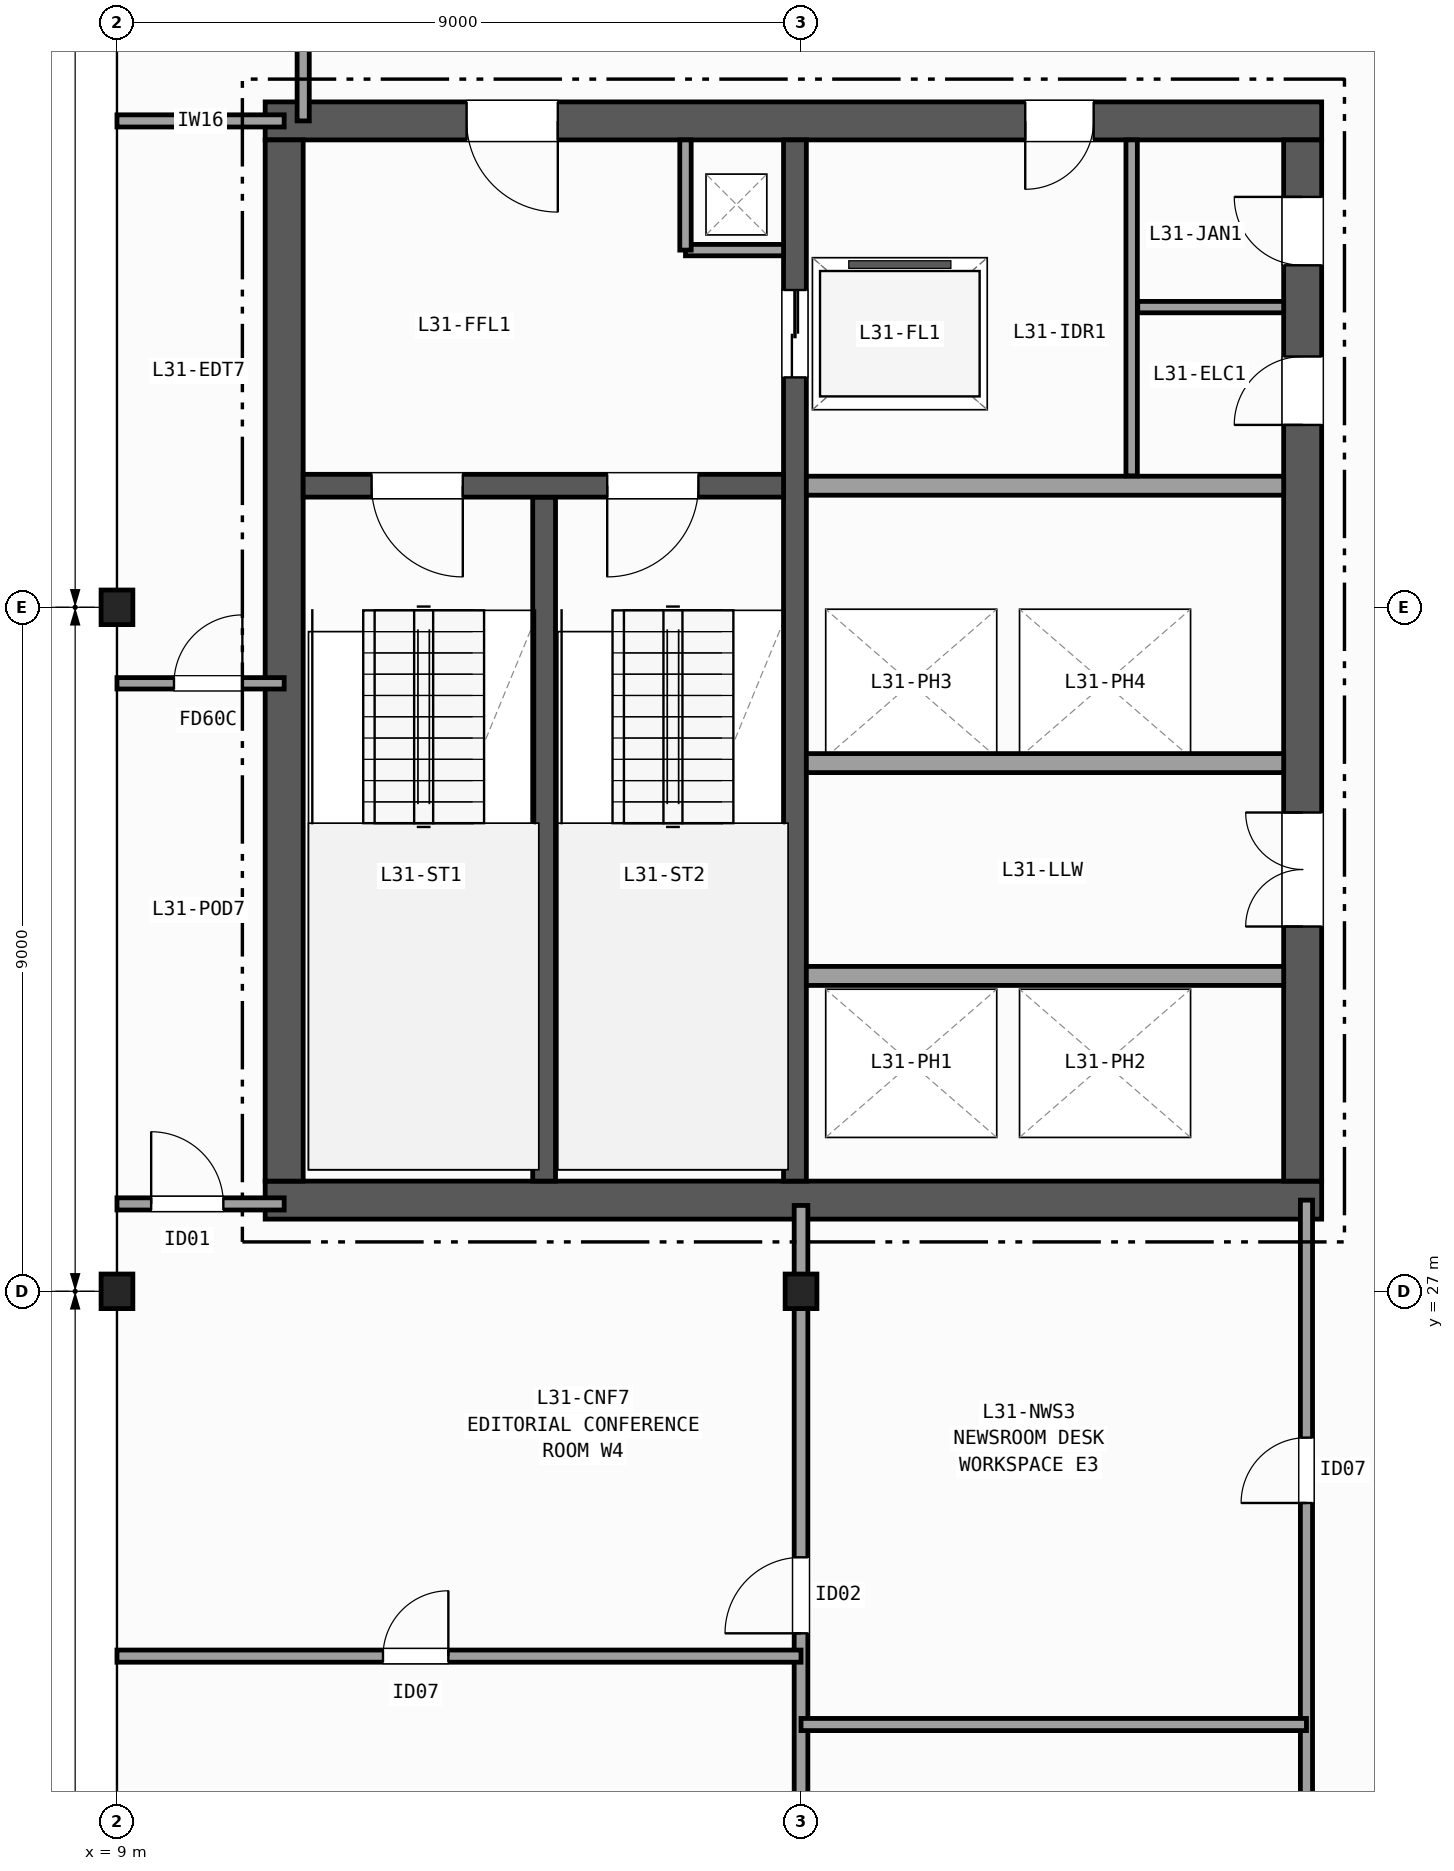
"""IFC4 building model, lengths in metres.
Left out: names, types, materials, properties, quantities, classifications, styles, units other than length and angle.
Written with IfcOpenShell. Run it as: python <this file> out.ifc"""

import sys

from ifc_helpers import new_model, si_unit, direction, frame, frame_2d, origin, origin_2d, place, context, subcontext, project, spatial, rectangle, i_section, extrude, element, fill, save


model = new_model("IFC4")
c1 = context("Model", 3, precision=1e-05, world=origin(), true_north=direction((0.0, 1.0)))
c2 = subcontext(c1, "Body", "Model", "MODEL_VIEW")
j1 = project(units=[si_unit("LENGTHUNIT", "METRE"), si_unit("PLANEANGLEUNIT", "RADIAN")], contexts=[c1])
p1 = place(None, origin())
s1 = spatial("IfcSite", under=j1, at=p1, CompositionType="ELEMENT")
p2 = place(p1, origin())
s2 = spatial("IfcBuilding", under=s1, at=p2, CompositionType="ELEMENT")
p3 = place(p2, frame((0.0, 0.0, 128.5)))
s3 = spatial("IfcBuildingStorey", under=s2, at=p3, CompositionType="ELEMENT", Elevation=128.5)
for number, where, z_axis, x_axis in (
    (1, (9.0, 27.0, 0.0), (0.0, 0.0, 1.0), (1.0, 0.0, 0.0)),
    (2, (9.0, 36.0, 0.0), (0.0, 0.0, 1.0), (1.0, 0.0, 0.0)),
    (3, (18.0, 27.0, 0.0), (0.0, 0.0, 1.0), (1.0, 0.0, 0.0)),
):
    element("IfcColumn", number, at=place(p3, frame(where, z_axis=z_axis, x_axis=x_axis)), inside=s3, PredefinedType="COLUMN", context=c2, shape_type="SweptSolid", body=[
        extrude(i_section(OverallWidth=0.418, OverallDepth=0.455, WebThickness=0.042, FlangeThickness=0.068, FilletRadius=0.015, at=origin_2d()), origin(), (0.0, 0.0, 1.0), 3.7),
    ])
p4 = place(p3, frame((10.95, 28.2, 0.0), z_axis=(0.0, 0.0, 1.0), x_axis=(1.0, 0.0, 0.0)))
e4 = element("IfcWall", 4, at=p4, inside=s3, PredefinedType="SHEAR", context=c2, shape_type="SweptSolid", body=[
    extrude(rectangle(XDim=13.9, YDim=0.5, at=frame_2d((6.95, 0.0))), origin(), (0.0, 0.0, 1.0), 3.42),
])
p5 = place(p3, frame((24.85, 42.4, 0.0), z_axis=(0.0, 0.0, 1.0), x_axis=(-1.0, 0.0, 0.0)))
e5 = element("IfcWall", 5, at=p5, inside=s3, PredefinedType="SHEAR", context=c2, shape_type="SweptSolid", body=[
    extrude(rectangle(XDim=13.9, YDim=0.5, at=frame_2d((6.95, 0.0))), origin(), (0.0, 0.0, 1.0), 3.42),
])
p6 = place(p5, frame((10.05, 0.0, 0.0)))
e6 = element("IfcOpeningElement", 6, at=p6, cuts=e5, PredefinedType="OPENING", context=c2, shape_type="SweptSolid", body=[
    extrude(rectangle(XDim=1.2, YDim=2.15, at=frame_2d((0.6, 1.075))), frame((0.0, 0.26, 0.0), z_axis=(0.0, -1.0, 0.0), x_axis=(1.0, 0.0, 0.0)), (0.0, 0.0, 1.0), 0.52),
])
p7 = place(p5, frame((3.0, 0.0, 0.0)))
e7 = element("IfcOpeningElement", 7, at=p7, cuts=e5, PredefinedType="OPENING", context=c2, shape_type="SweptSolid", body=[
    extrude(rectangle(XDim=0.9, YDim=2.1, at=frame_2d((0.45, 1.05))), frame((0.0, 0.26, 0.0), z_axis=(0.0, -1.0, 0.0), x_axis=(1.0, 0.0, 0.0)), (0.0, 0.0, 1.0), 0.52),
])
p8 = place(p3, frame((11.2, 42.15, 0.0), z_axis=(0.0, 0.0, 1.0), x_axis=(0.0, -1.0, 0.0)))
e8 = element("IfcWall", 8, at=p8, inside=s3, PredefinedType="SHEAR", context=c2, shape_type="SweptSolid", body=[
    extrude(rectangle(XDim=13.7, YDim=0.5, at=frame_2d((6.85, 0.0))), origin(), (0.0, 0.0, 1.0), 3.42),
])
p9 = place(p3, frame((24.6, 28.45, 0.0), z_axis=(0.0, 0.0, 1.0), x_axis=(0.0, 1.0, 0.0)))
e9 = element("IfcWall", 9, at=p9, inside=s3, PredefinedType="SHEAR", context=c2, shape_type="SweptSolid", body=[
    extrude(rectangle(XDim=13.7, YDim=0.5, at=frame_2d((6.85, 0.0))), origin(), (0.0, 0.0, 1.0), 3.42),
])
p10 = place(p9, frame((3.35, 0.0, 0.0)))
e10 = element("IfcOpeningElement", 10, at=p10, cuts=e9, PredefinedType="OPENING", context=c2, shape_type="SweptSolid", body=[
    extrude(rectangle(XDim=1.5, YDim=2.2, at=frame_2d((0.75, 1.1))), frame((0.0, 0.26, 0.0), z_axis=(0.0, -1.0, 0.0), x_axis=(1.0, 0.0, 0.0)), (0.0, 0.0, 1.0), 0.52),
])
p11 = place(p9, frame((9.95, 0.0, 0.0)))
e11 = element("IfcOpeningElement", 11, at=p11, cuts=e9, PredefinedType="OPENING", context=c2, shape_type="SweptSolid", body=[
    extrude(rectangle(XDim=0.9, YDim=2.1, at=frame_2d((0.45, 1.05))), frame((0.0, 0.26, 0.0), z_axis=(0.0, -1.0, 0.0), x_axis=(1.0, 0.0, 0.0)), (0.0, 0.0, 1.0), 0.52),
])
p12 = place(p9, frame((12.05, 0.0, 0.0)))
e12 = element("IfcOpeningElement", 12, at=p12, cuts=e9, PredefinedType="OPENING", context=c2, shape_type="SweptSolid", body=[
    extrude(rectangle(XDim=0.9, YDim=2.1, at=frame_2d((0.45, 1.05))), frame((0.0, 0.26, 0.0), z_axis=(0.0, -1.0, 0.0), x_axis=(1.0, 0.0, 0.0)), (0.0, 0.0, 1.0), 0.52),
])
p13 = place(p3, frame((14.62, 28.45, 0.0), z_axis=(0.0, 0.0, 1.0), x_axis=(0.0, 1.0, 0.0)))
e13 = element("IfcWall", 13, at=p13, inside=s3, PredefinedType="SHEAR", context=c2, shape_type="SweptSolid", body=[
    extrude(rectangle(XDim=9.0, YDim=0.3, at=frame_2d((4.5, 0.0))), origin(), (0.0, 0.0, 1.0), 3.42),
])
p14 = place(p3, frame((17.92, 42.15, 0.0), z_axis=(0.0, 0.0, 1.0), x_axis=(0.0, -1.0, 0.0)))
e14 = element("IfcWall", 14, at=p14, inside=s3, PredefinedType="SHEAR", context=c2, shape_type="SweptSolid", body=[
    extrude(rectangle(XDim=13.7, YDim=0.3, at=frame_2d((6.85, 0.0))), origin(), (0.0, 0.0, 1.0), 3.42),
])
p15 = place(p14, frame((1.975, 0.0, 0.0)))
e15 = element("IfcOpeningElement", 15, at=p15, cuts=e14, PredefinedType="OPENING", context=c2, shape_type="SweptSolid", body=[
    extrude(rectangle(XDim=1.15, YDim=2.15, at=frame_2d((0.575, 1.075))), frame((0.0, 0.16, 0.0), z_axis=(0.0, -1.0, 0.0), x_axis=(1.0, 0.0, 0.0)), (0.0, 0.0, 1.0), 0.32),
])
p16 = place(p3, frame((17.77, 37.6, 0.0), z_axis=(0.0, 0.0, 1.0), x_axis=(-1.0, 0.0, 0.0)))
e16 = element("IfcWall", 16, at=p16, inside=s3, PredefinedType="SHEAR", context=c2, shape_type="SweptSolid", body=[
    extrude(rectangle(XDim=6.32, YDim=0.3, at=frame_2d((3.16, 0.0))), origin(), (0.0, 0.0, 1.0), 3.42),
])
p17 = place(p16, frame((4.22, 0.0, 0.0)))
e17 = element("IfcOpeningElement", 17, at=p17, cuts=e16, PredefinedType="OPENING", context=c2, shape_type="SweptSolid", body=[
    extrude(rectangle(XDim=1.2, YDim=2.15, at=frame_2d((0.6, 1.075))), frame((0.0, 0.16, 0.0), z_axis=(0.0, -1.0, 0.0), x_axis=(1.0, 0.0, 0.0)), (0.0, 0.0, 1.0), 0.32),
])
p18 = place(p16, frame((1.12, 0.0, 0.0)))
e18 = element("IfcOpeningElement", 18, at=p18, cuts=e16, PredefinedType="OPENING", context=c2, shape_type="SweptSolid", body=[
    extrude(rectangle(XDim=1.2, YDim=2.15, at=frame_2d((0.6, 1.075))), frame((0.0, 0.16, 0.0), z_axis=(0.0, -1.0, 0.0), x_axis=(1.0, 0.0, 0.0)), (0.0, 0.0, 1.0), 0.32),
])
p19 = place(p3, frame((16.48, 40.7, 0.0), z_axis=(0.0, 0.0, 1.0), x_axis=(1.0, 0.0, 0.0)))
e19 = element("IfcWall", 19, at=p19, inside=s3, PredefinedType="PARTITIONING", context=c2, shape_type="SweptSolid", body=[
    extrude(rectangle(XDim=1.29, YDim=0.15, at=frame_2d((0.645, 0.0))), origin(), (0.0, 0.0, 1.0), 3.42),
])
p20 = place(p3, frame((16.48, 40.7, 0.0), z_axis=(0.0, 0.0, 1.0), x_axis=(0.0, 1.0, 0.0)))
e20 = element("IfcWall", 20, at=p20, inside=s3, PredefinedType="PARTITIONING", context=c2, shape_type="SweptSolid", body=[
    extrude(rectangle(XDim=1.45, YDim=0.15, at=frame_2d((0.725, 0.0))), origin(), (0.0, 0.0, 1.0), 3.42),
])
for number, where, z_axis, x_axis in (
    (21, (18.07, 37.6, 0.0), (0.0, 0.0, 1.0), (1.0, 0.0, 0.0)),
    (22, (18.07, 31.15, 0.0), (0.0, 0.0, 1.0), (1.0, 0.0, 0.0)),
    (23, (24.35, 33.95, 0.0), (0.0, 0.0, 1.0), (-1.0, 0.0, 0.0)),
):
    element("IfcWall", number, at=place(p3, frame(where, z_axis=z_axis, x_axis=x_axis)), inside=s3, PredefinedType="PARTITIONING", context=c2, shape_type="SweptSolid", body=[
        extrude(rectangle(XDim=6.28, YDim=0.25, at=frame_2d((3.14, 0.0))), origin(), (0.0, 0.0, 1.0), 3.42),
    ])
p21 = place(p3, frame((22.35, 37.73, 0.0), z_axis=(0.0, 0.0, 1.0), x_axis=(0.0, 1.0, 0.0)))
e24 = element("IfcWall", 24, at=p21, inside=s3, PredefinedType="PARTITIONING", context=c2, shape_type="SweptSolid", body=[
    extrude(rectangle(XDim=4.42, YDim=0.15, at=frame_2d((2.21, 0.0))), origin(), (0.0, 0.0, 1.0), 3.42),
])
p22 = place(p3, frame((22.43, 39.95, 0.0), z_axis=(0.0, 0.0, 1.0), x_axis=(1.0, 0.0, 0.0)))
e25 = element("IfcWall", 25, at=p22, inside=s3, PredefinedType="PARTITIONING", context=c2, shape_type="SweptSolid", body=[
    extrude(rectangle(XDim=1.92, YDim=0.15, at=frame_2d((0.96, 0.0))), origin(), (0.0, 0.0, 1.0), 3.42),
])
p23 = place(p3, frame((9.0, 28.15, 0.0), z_axis=(0.0, 0.0, 1.0), x_axis=(1.0, 0.0, 0.0)))
e26 = element("IfcWall", 26, at=p23, inside=s3, PredefinedType="PARTITIONING", context=c2, shape_type="SweptSolid", body=[
    extrude(rectangle(XDim=2.2, YDim=0.16, at=frame_2d((1.1, 0.0))), origin(), (0.0, 0.0, 1.0), 2.634),
])
p24 = place(p23, frame((0.45, 0.0, 0.0)))
e27 = element("IfcOpeningElement", 27, at=p24, cuts=e26, PredefinedType="OPENING", context=c2, shape_type="SweptSolid", body=[
    extrude(rectangle(XDim=0.95, YDim=2.1, at=frame_2d((0.475, 1.05))), frame((0.0, 0.09, 0.0), z_axis=(0.0, -1.0, 0.0), x_axis=(1.0, 0.0, 0.0)), (0.0, 0.0, 1.0), 0.18),
])
p25 = place(p3, frame((9.0, 42.4, 0.0), z_axis=(0.0, 0.0, 1.0), x_axis=(1.0, 0.0, 0.0)))
e28 = element("IfcWall", 28, at=p25, inside=s3, PredefinedType="PARTITIONING", context=c2, shape_type="SweptSolid", body=[
    extrude(rectangle(XDim=2.2, YDim=0.16, at=frame_2d((1.1, 0.0))), origin(), (0.0, 0.0, 1.0), 2.634),
])
p26 = place(p3, frame((11.45, 42.4, 0.0), z_axis=(0.0, 0.0, 1.0), x_axis=(0.0, 1.0, 0.0)))
e29 = element("IfcWall", 29, at=p26, inside=s3, PredefinedType="PARTITIONING", context=c2, shape_type="SweptSolid", body=[
    extrude(rectangle(XDim=2.1, YDim=0.16, at=frame_2d((1.05, 0.0))), origin(), (0.0, 0.0, 1.0), 3.42),
])
p27 = place(p3, frame((9.0, 35.0, 0.0), z_axis=(0.0, 0.0, 1.0), x_axis=(1.0, 0.0, 0.0)))
e30 = element("IfcWall", 30, at=p27, inside=s3, PredefinedType="PARTITIONING", context=c2, shape_type="SweptSolid", body=[
    extrude(rectangle(XDim=2.2, YDim=0.15, at=frame_2d((1.1, 0.0))), origin(), (0.0, 0.0, 1.0), 2.634),
])
p28 = place(p27, frame((0.75, 0.0, 0.0)))
e31 = element("IfcOpeningElement", 31, at=p28, cuts=e30, PredefinedType="OPENING", context=c2, shape_type="SweptSolid", body=[
    extrude(rectangle(XDim=0.9, YDim=2.1, at=frame_2d((0.45, 1.05))), frame((0.0, 0.085, 0.0), z_axis=(0.0, -1.0, 0.0), x_axis=(1.0, 0.0, 0.0)), (0.0, 0.0, 1.0), 0.17),
])
p29 = place(p3, frame((24.65, 9.0, 0.0), z_axis=(0.0, 0.0, 1.0), x_axis=(0.0, 1.0, 0.0)))
e32 = element("IfcWall", 32, at=p29, inside=s3, PredefinedType="PARTITIONING", context=c2, shape_type="SweptSolid", body=[
    extrude(rectangle(XDim=19.2, YDim=0.16, at=frame_2d((9.6, 0.0))), origin(), (0.0, 0.0, 1.0), 2.634),
])
p30 = place(p29, frame((2.0, 0.0, 0.0)))
e33 = element("IfcOpeningElement", 33, at=p30, cuts=e32, PredefinedType="OPENING", context=c2, shape_type="SweptSolid", body=[
    extrude(rectangle(XDim=1.05, YDim=2.15, at=frame_2d((0.525, 1.075))), frame((0.0, 0.09, 0.0), z_axis=(0.0, -1.0, 0.0), x_axis=(1.0, 0.0, 0.0)), (0.0, 0.0, 1.0), 0.18),
])
p31 = place(p29, frame((8.15, 0.0, 0.0)))
e34 = element("IfcOpeningElement", 34, at=p31, cuts=e32, PredefinedType="OPENING", context=c2, shape_type="SweptSolid", body=[
    extrude(rectangle(XDim=1.2, YDim=2.15, at=frame_2d((0.6, 1.075))), frame((0.0, 0.09, 0.0), z_axis=(0.0, -1.0, 0.0), x_axis=(1.0, 0.0, 0.0)), (0.0, 0.0, 1.0), 0.18),
])
p32 = place(p29, frame((15.215, 0.0, 0.0)))
e35 = element("IfcOpeningElement", 35, at=p32, cuts=e32, PredefinedType="OPENING", context=c2, shape_type="SweptSolid", body=[
    extrude(rectangle(XDim=0.86, YDim=2.05, at=frame_2d((0.43, 1.025))), frame((0.0, 0.09, 0.0), z_axis=(0.0, -1.0, 0.0), x_axis=(1.0, 0.0, 0.0)), (0.0, 0.0, 1.0), 0.18),
])
p33 = place(p3, frame((18.0, 9.0, 0.0), z_axis=(0.0, 0.0, 1.0), x_axis=(0.0, 1.0, 0.0)))
e36 = element("IfcWall", 36, at=p33, inside=s3, PredefinedType="PARTITIONING", context=c2, shape_type="SweptSolid", body=[
    extrude(rectangle(XDim=19.13, YDim=0.18, at=frame_2d((9.565, 0.0))), origin(), (0.0, 0.0, 1.0), 2.634),
])
p34 = place(p33, frame((2.2, 0.0, 0.0)))
e37 = element("IfcOpeningElement", 37, at=p34, cuts=e36, PredefinedType="OPENING", context=c2, shape_type="SweptSolid", body=[
    extrude(rectangle(XDim=0.95, YDim=2.1, at=frame_2d((0.475, 1.05))), frame((0.0, 0.1, 0.0), z_axis=(0.0, -1.0, 0.0), x_axis=(1.0, 0.0, 0.0)), (0.0, 0.0, 1.0), 0.2),
])
p35 = place(p33, frame((13.5, 0.0, 0.0)))
e38 = element("IfcOpeningElement", 38, at=p35, cuts=e36, PredefinedType="OPENING", context=c2, shape_type="SweptSolid", body=[
    extrude(rectangle(XDim=1.0, YDim=2.1, at=frame_2d((0.5, 1.05))), frame((0.0, 0.1, 0.0), z_axis=(0.0, -1.0, 0.0), x_axis=(1.0, 0.0, 0.0)), (0.0, 0.0, 1.0), 0.2),
])
p36 = place(p3, frame((18.0, 21.3, 0.0), z_axis=(0.0, 0.0, 1.0), x_axis=(1.0, 0.0, 0.0)))
e39 = element("IfcWall", 39, at=p36, inside=s3, PredefinedType="PARTITIONING", context=c2, shape_type="SweptSolid", body=[
    extrude(rectangle(XDim=6.65, YDim=0.16, at=frame_2d((3.325, 0.0))), origin(), (0.0, 0.0, 1.0), 2.792),
])
p37 = place(p3, frame((9.0, 22.2, 0.0), z_axis=(0.0, 0.0, 1.0), x_axis=(1.0, 0.0, 0.0)))
e40 = element("IfcWall", 40, at=p37, inside=s3, PredefinedType="PARTITIONING", context=c2, shape_type="SweptSolid", body=[
    extrude(rectangle(XDim=9.0, YDim=0.16, at=frame_2d((4.5, 0.0))), origin(), (0.0, 0.0, 1.0), 2.634),
])
p38 = place(p37, frame((3.5, 0.0, 0.0)))
e41 = element("IfcOpeningElement", 41, at=p38, cuts=e40, PredefinedType="OPENING", context=c2, shape_type="SweptSolid", body=[
    extrude(rectangle(XDim=0.86, YDim=2.05, at=frame_2d((0.43, 1.025))), frame((0.0, 0.09, 0.0), z_axis=(0.0, -1.0, 0.0), x_axis=(1.0, 0.0, 0.0)), (0.0, 0.0, 1.0), 0.18),
])
p39 = place(p17, origin())
e42 = element("IfcDoor", 42, at=p39, inside=s3, OperationType="SINGLE_SWING_LEFT", PredefinedType="DOOR", context=c2, shape_type="SweptSolid", body=[
    extrude(rectangle(XDim=1.2, YDim=2.15, at=frame_2d((0.6, 1.075))), frame((0.0, 0.025, 0.0), z_axis=(0.0, -1.0, 0.0), x_axis=(1.0, 0.0, 0.0)), (0.0, 0.0, 1.0), 0.05),
])
fill(e17, e42)
p40 = place(p18, origin())
e43 = element("IfcDoor", 43, at=p40, inside=s3, OperationType="SINGLE_SWING_RIGHT", PredefinedType="DOOR", context=c2, shape_type="SweptSolid", body=[
    extrude(rectangle(XDim=1.2, YDim=2.15, at=frame_2d((0.6, 1.075))), frame((0.0, 0.025, 0.0), z_axis=(0.0, -1.0, 0.0), x_axis=(1.0, 0.0, 0.0)), (0.0, 0.0, 1.0), 0.05),
])
fill(e18, e43)
p41 = place(p10, origin())
e44 = element("IfcDoor", 44, at=p41, inside=s3, OperationType="DOUBLE_DOOR_SINGLE_SWING", PredefinedType="DOOR", context=c2, shape_type="SweptSolid", body=[
    extrude(rectangle(XDim=1.5, YDim=2.2, at=frame_2d((0.75, 1.1))), frame((0.0, 0.025, 0.0), z_axis=(0.0, -1.0, 0.0), x_axis=(1.0, 0.0, 0.0)), (0.0, 0.0, 1.0), 0.05),
])
fill(e10, e44)
p42 = place(p6, origin())
e45 = element("IfcDoor", 45, at=p42, inside=s3, OperationType="SINGLE_SWING_LEFT", PredefinedType="DOOR", context=c2, shape_type="SweptSolid", body=[
    extrude(rectangle(XDim=1.2, YDim=2.15, at=frame_2d((0.6, 1.075))), frame((0.0, 0.025, 0.0), z_axis=(0.0, -1.0, 0.0), x_axis=(1.0, 0.0, 0.0)), (0.0, 0.0, 1.0), 0.05),
])
fill(e6, e45)
p43 = place(p11, origin())
e46 = element("IfcDoor", 46, at=p43, inside=s3, OperationType="SINGLE_SWING_LEFT", PredefinedType="DOOR", context=c2, shape_type="SweptSolid", body=[
    extrude(rectangle(XDim=0.9, YDim=2.1, at=frame_2d((0.45, 1.05))), frame((0.0, 0.025, 0.0), z_axis=(0.0, -1.0, 0.0), x_axis=(1.0, 0.0, 0.0)), (0.0, 0.0, 1.0), 0.05),
])
fill(e11, e46)
p44 = place(p7, origin())
e47 = element("IfcDoor", 47, at=p44, inside=s3, OperationType="SINGLE_SWING_RIGHT", PredefinedType="DOOR", context=c2, shape_type="SweptSolid", body=[
    extrude(rectangle(XDim=0.9, YDim=2.1, at=frame_2d((0.45, 1.05))), frame((0.0, 0.025, 0.0), z_axis=(0.0, -1.0, 0.0), x_axis=(1.0, 0.0, 0.0)), (0.0, 0.0, 1.0), 0.05),
])
fill(e7, e47)
p45 = place(p12, origin())
e48 = element("IfcDoor", 48, at=p45, inside=s3, OperationType="SINGLE_SWING_RIGHT", PredefinedType="DOOR", context=c2, shape_type="SweptSolid", body=[
    extrude(rectangle(XDim=0.9, YDim=2.1, at=frame_2d((0.45, 1.05))), frame((0.0, 0.025, 0.0), z_axis=(0.0, -1.0, 0.0), x_axis=(1.0, 0.0, 0.0)), (0.0, 0.0, 1.0), 0.05),
])
fill(e12, e48)
p46 = place(p15, origin())
e49 = element("IfcDoor", 49, at=p46, inside=s3, OperationType="DOUBLE_DOOR_SLIDING", PredefinedType="DOOR", context=c2, shape_type="SweptSolid", body=[
    extrude(rectangle(XDim=1.15, YDim=2.15, at=frame_2d((0.575, 1.075))), frame((0.0, 0.025, 0.0), z_axis=(0.0, -1.0, 0.0), x_axis=(1.0, 0.0, 0.0)), (0.0, 0.0, 1.0), 0.05),
])
fill(e15, e49)
p47 = place(p24, origin())
e50 = element("IfcDoor", 50, at=p47, inside=s3, OperationType="SINGLE_SWING_LEFT", PredefinedType="DOOR", context=c2, shape_type="SweptSolid", body=[
    extrude(rectangle(XDim=0.95, YDim=2.1, at=frame_2d((0.475, 1.05))), frame((0.0, 0.025, 0.0), z_axis=(0.0, -1.0, 0.0), x_axis=(1.0, 0.0, 0.0)), (0.0, 0.0, 1.0), 0.05),
])
fill(e27, e50)
p48 = place(p28, origin())
e51 = element("IfcDoor", 51, at=p48, inside=s3, OperationType="SINGLE_SWING_RIGHT", PredefinedType="DOOR", context=c2, shape_type="SweptSolid", body=[
    extrude(rectangle(XDim=0.9, YDim=2.1, at=frame_2d((0.45, 1.05))), frame((0.0, 0.025, 0.0), z_axis=(0.0, -1.0, 0.0), x_axis=(1.0, 0.0, 0.0)), (0.0, 0.0, 1.0), 0.05),
])
fill(e31, e51)
p49 = place(p32, origin())
e52 = element("IfcDoor", 52, at=p49, inside=s3, OperationType="SINGLE_SWING_LEFT", PredefinedType="DOOR", context=c2, shape_type="SweptSolid", body=[
    extrude(rectangle(XDim=0.86, YDim=2.05, at=frame_2d((0.43, 1.025))), frame((0.0, 0.025, 0.0), z_axis=(0.0, -1.0, 0.0), x_axis=(1.0, 0.0, 0.0)), (0.0, 0.0, 1.0), 0.05),
])
fill(e35, e52)
p50 = place(p35, origin())
e53 = element("IfcDoor", 53, at=p50, inside=s3, OperationType="SINGLE_SWING_LEFT", PredefinedType="DOOR", context=c2, shape_type="SweptSolid", body=[
    extrude(rectangle(XDim=1.0, YDim=2.1, at=frame_2d((0.5, 1.05))), frame((0.0, 0.025, 0.0), z_axis=(0.0, -1.0, 0.0), x_axis=(1.0, 0.0, 0.0)), (0.0, 0.0, 1.0), 0.05),
])
fill(e38, e53)
p51 = place(p38, origin())
e54 = element("IfcDoor", 54, at=p51, inside=s3, OperationType="SINGLE_SWING_RIGHT", PredefinedType="DOOR", context=c2, shape_type="SweptSolid", body=[
    extrude(rectangle(XDim=0.86, YDim=2.05, at=frame_2d((0.43, 1.025))), frame((0.0, 0.025, 0.0), z_axis=(0.0, -1.0, 0.0), x_axis=(1.0, 0.0, 0.0)), (0.0, 0.0, 1.0), 0.05),
])
fill(e41, e54)
save(model, sys.argv[1])
